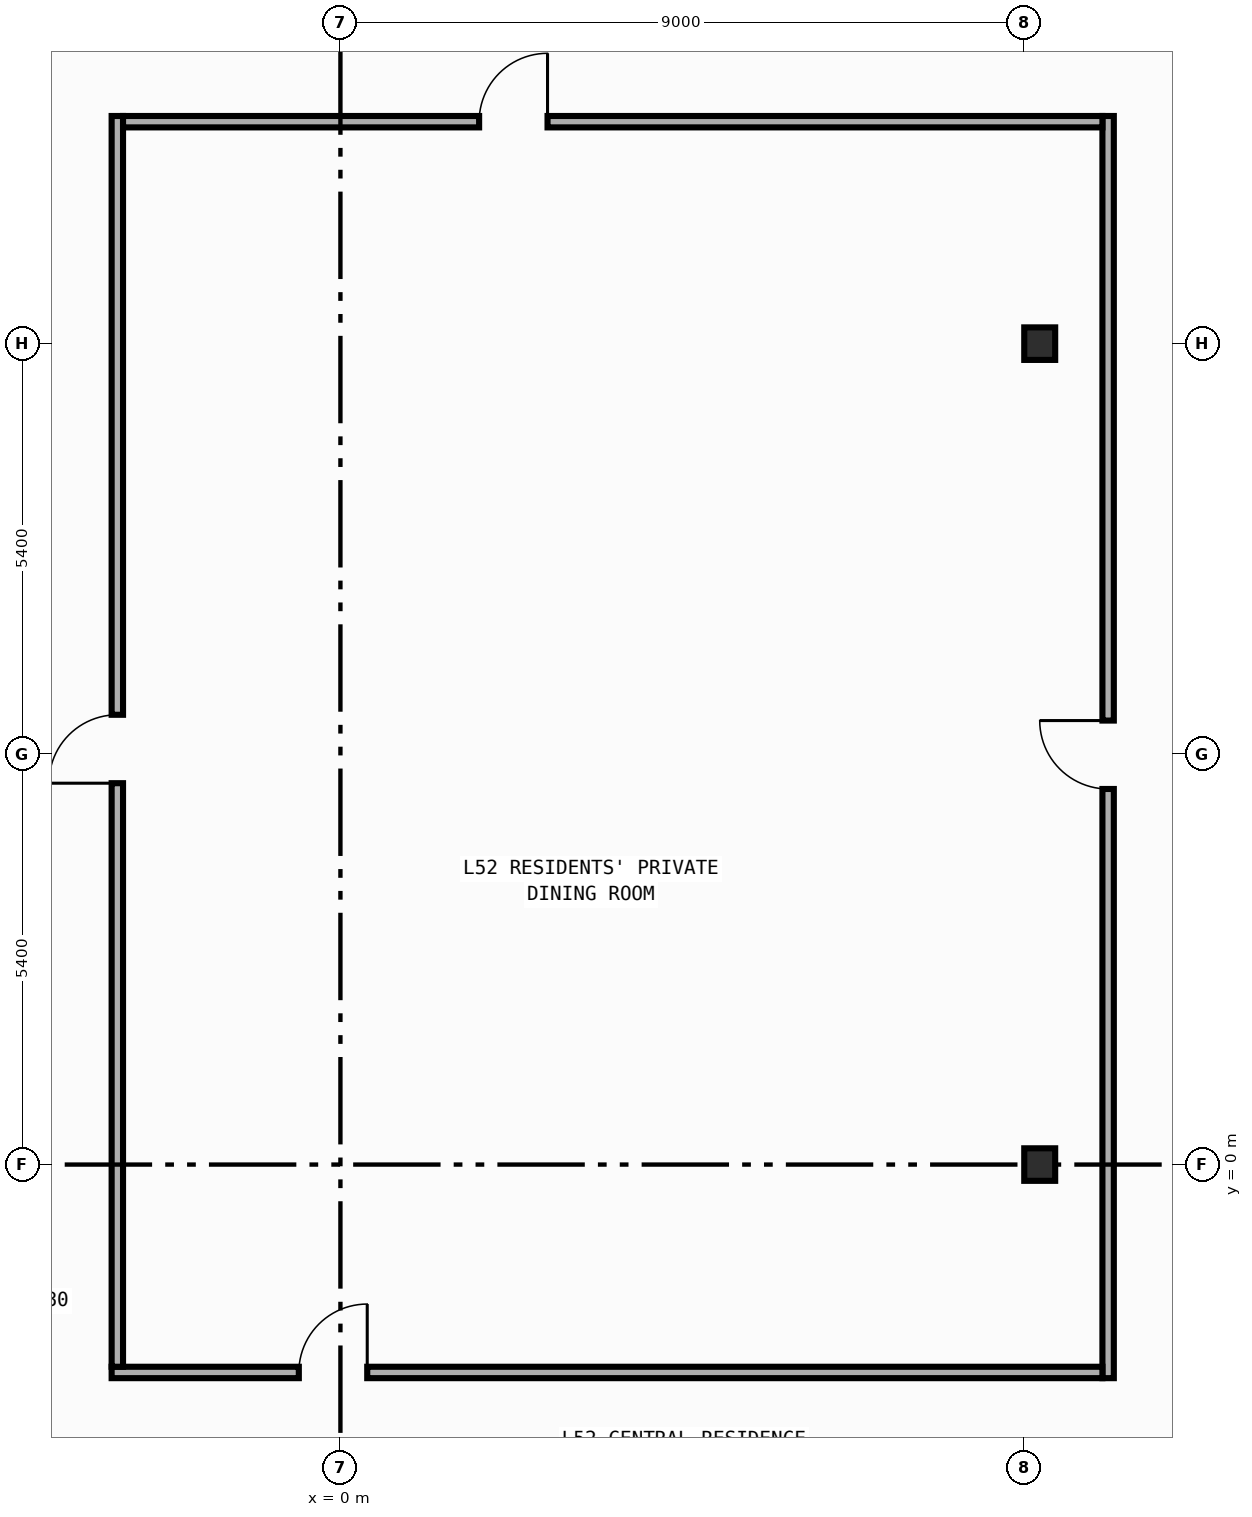
"""IFC4 building model, lengths in metres.
Left out: names, types, materials, properties, quantities, classifications, styles, units other than length and angle.
Written with IfcOpenShell. Run it as: python <this file> out.ifc"""

import sys

from ifc_helpers import new_model, si_unit, direction, frame, frame_2d, origin, origin_2d, place, context, subcontext, project, spatial, rectangle, i_section, extrude, element, fill, save


model = new_model("IFC4")
c1 = context("Model", 3, precision=1e-05, world=origin(), true_north=direction((0.0, 1.0)))
c2 = subcontext(c1, "Body", "Model", "MODEL_VIEW")
j1 = project(units=[si_unit("LENGTHUNIT", "METRE"), si_unit("PLANEANGLEUNIT", "RADIAN")], contexts=[c1])
p1 = place(None, origin())
s1 = spatial("IfcSite", under=j1, at=p1, CompositionType="ELEMENT")
p2 = place(p1, origin())
s2 = spatial("IfcBuilding", under=s1, at=p2, CompositionType="ELEMENT")
p3 = place(p2, frame((0.0, 0.0, 226.0)))
s3 = spatial("IfcBuildingStorey", under=s2, at=p3, CompositionType="ELEMENT", Elevation=226.0)
for number, where, z_axis, x_axis in (
    (1, (9.2, 0.0, 0.0), (0.0, 0.0, 1.0), (1.0, 0.0, 0.0)),
    (2, (9.2, 10.8, 0.0), (0.0, 0.0, 1.0), (1.0, 0.0, 0.0)),
):
    element("IfcColumn", number, at=place(p3, frame(where, z_axis=z_axis, x_axis=x_axis)), inside=s3, PredefinedType="COLUMN", context=c2, shape_type="SweptSolid", body=[
        extrude(i_section(OverallWidth=0.407, OverallDepth=0.428, WebThickness=0.02, FlangeThickness=0.035, FilletRadius=0.022, at=origin_2d()), origin(), (0.0, 0.0, 1.0), 3.6),
    ])
p4 = place(p3, frame((10.1, -2.81, 0.0), z_axis=(0.0, 0.0, 1.0), x_axis=(0.0, 1.0, 0.0)))
e3 = element("IfcWall", 3, at=p4, inside=s3, PredefinedType="PARTITIONING", context=c2, shape_type="SweptSolid", body=[
    extrude(rectangle(XDim=16.605, YDim=0.15, at=frame_2d((8.302, 0.0))), origin(), (0.0, 0.0, 1.0), 3.34),
])
p5 = place(p4, frame((7.751, 0.0, 0.0)))
e4 = element("IfcOpeningElement", 4, at=p5, cuts=e3, PredefinedType="OPENING", context=c2, shape_type="SweptSolid", body=[
    extrude(rectangle(XDim=0.9, YDim=2.15, at=frame_2d((0.45, 1.075))), frame((0.0, 0.085, 0.0), z_axis=(0.0, -1.0, 0.0), x_axis=(1.0, 0.0, 0.0)), (0.0, 0.0, 1.0), 0.17),
])
p6 = place(p3, frame((-3.01, -2.735, 0.0), z_axis=(0.0, 0.0, 1.0), x_axis=(1.0, 0.0, 0.0)))
e5 = element("IfcWall", 5, at=p6, inside=s3, PredefinedType="PARTITIONING", context=c2, shape_type="SweptSolid", body=[
    extrude(rectangle(XDim=13.035, YDim=0.15, at=frame_2d((6.518, 0.0))), origin(), (0.0, 0.0, 1.0), 3.34),
])
p7 = place(p6, frame((2.463, 0.0, 0.0)))
e6 = element("IfcOpeningElement", 6, at=p7, cuts=e5, PredefinedType="OPENING", context=c2, shape_type="SweptSolid", body=[
    extrude(rectangle(XDim=0.9, YDim=2.15, at=frame_2d((0.45, 1.075))), frame((0.0, 0.085, 0.0), z_axis=(0.0, -1.0, 0.0), x_axis=(1.0, 0.0, 0.0)), (0.0, 0.0, 1.0), 0.17),
])
p8 = place(p3, frame((-2.935, -2.66, 0.0), z_axis=(0.0, 0.0, 1.0), x_axis=(0.0, 1.0, 0.0)))
e7 = element("IfcWall", 7, at=p8, inside=s3, PredefinedType="PARTITIONING", context=c2, shape_type="SweptSolid", body=[
    extrude(rectangle(XDim=16.455, YDim=0.15, at=frame_2d((8.228, 0.0))), origin(), (0.0, 0.0, 1.0), 3.34),
])
p9 = place(p8, frame((7.677, 0.0, 0.0)))
e8 = element("IfcOpeningElement", 8, at=p9, cuts=e7, PredefinedType="OPENING", context=c2, shape_type="SweptSolid", body=[
    extrude(rectangle(XDim=0.9, YDim=2.15, at=frame_2d((0.45, 1.075))), frame((0.0, 0.085, 0.0), z_axis=(0.0, -1.0, 0.0), x_axis=(1.0, 0.0, 0.0)), (0.0, 0.0, 1.0), 0.17),
])
p10 = place(p3, frame((-2.86, 13.72, 0.0), z_axis=(0.0, 0.0, 1.0), x_axis=(1.0, 0.0, 0.0)))
e9 = element("IfcWall", 9, at=p10, inside=s3, PredefinedType="PARTITIONING", context=c2, shape_type="SweptSolid", body=[
    extrude(rectangle(XDim=12.885, YDim=0.15, at=frame_2d((6.442, 0.0))), origin(), (0.0, 0.0, 1.0), 3.34),
])
p11 = place(p10, frame((4.685, 0.0, 0.0)))
e10 = element("IfcOpeningElement", 10, at=p11, cuts=e9, PredefinedType="OPENING", context=c2, shape_type="SweptSolid", body=[
    extrude(rectangle(XDim=0.9, YDim=2.15, at=frame_2d((0.45, 1.075))), frame((0.0, 0.085, 0.0), z_axis=(0.0, -1.0, 0.0), x_axis=(1.0, 0.0, 0.0)), (0.0, 0.0, 1.0), 0.17),
])
p12 = place(p5, origin())
e11 = element("IfcDoor", 11, at=p12, inside=s3, OperationType="SINGLE_SWING_RIGHT", PredefinedType="DOOR", context=c2, shape_type="SweptSolid", body=[
    extrude(rectangle(XDim=0.9, YDim=2.15, at=frame_2d((0.45, 1.075))), frame((0.0, 0.025, 0.0), z_axis=(0.0, -1.0, 0.0), x_axis=(1.0, 0.0, 0.0)), (0.0, 0.0, 1.0), 0.05),
])
fill(e4, e11)
p13 = place(p7, origin())
e12 = element("IfcDoor", 12, at=p13, inside=s3, OperationType="SINGLE_SWING_RIGHT", PredefinedType="DOOR", context=c2, shape_type="SweptSolid", body=[
    extrude(rectangle(XDim=0.9, YDim=2.15, at=frame_2d((0.45, 1.075))), frame((0.0, 0.025, 0.0), z_axis=(0.0, -1.0, 0.0), x_axis=(1.0, 0.0, 0.0)), (0.0, 0.0, 1.0), 0.05),
])
fill(e6, e12)
p14 = place(p9, origin())
e13 = element("IfcDoor", 13, at=p14, inside=s3, OperationType="SINGLE_SWING_LEFT", PredefinedType="DOOR", context=c2, shape_type="SweptSolid", body=[
    extrude(rectangle(XDim=0.9, YDim=2.15, at=frame_2d((0.45, 1.075))), frame((0.0, 0.025, 0.0), z_axis=(0.0, -1.0, 0.0), x_axis=(1.0, 0.0, 0.0)), (0.0, 0.0, 1.0), 0.05),
])
fill(e8, e13)
p15 = place(p11, origin())
e14 = element("IfcDoor", 14, at=p15, inside=s3, OperationType="SINGLE_SWING_RIGHT", PredefinedType="DOOR", context=c2, shape_type="SweptSolid", body=[
    extrude(rectangle(XDim=0.9, YDim=2.15, at=frame_2d((0.45, 1.075))), frame((0.0, 0.025, 0.0), z_axis=(0.0, -1.0, 0.0), x_axis=(1.0, 0.0, 0.0)), (0.0, 0.0, 1.0), 0.05),
])
fill(e10, e14)
save(model, sys.argv[1])
